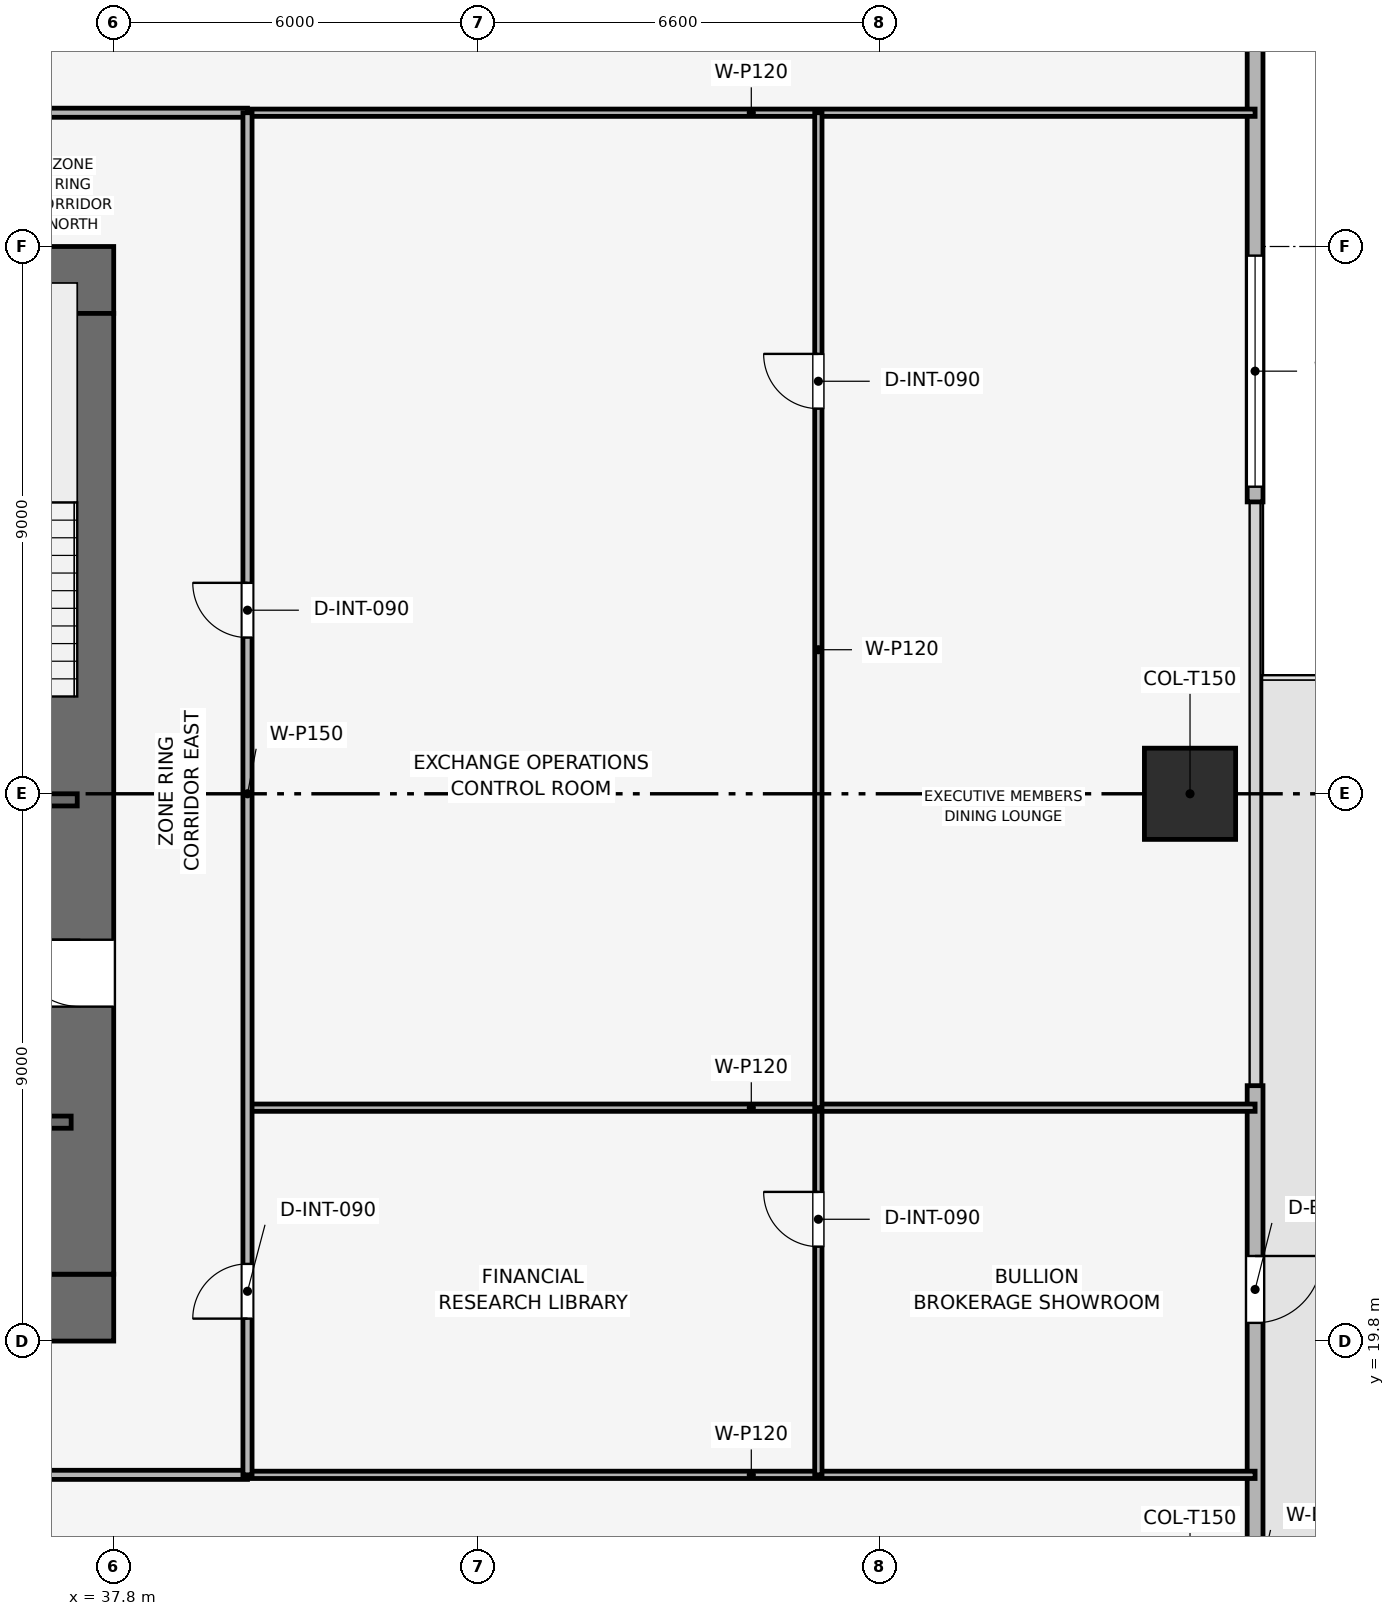
"""IFC4 building model, lengths in metres.
Left out: names, types, materials, properties, quantities, classifications, styles, units other than length and angle.
Written with IfcOpenShell. Run it as: python <this file> out.ifc"""

import sys

from ifc_helpers import new_model, si_unit, direction, frame, frame_2d, origin, origin_2d, place, context, subcontext, project, spatial, rectangle, extrude, element, fill, save


model = new_model("IFC4")
c1 = context("Model", 3, precision=1e-05, world=origin(), true_north=direction((0.0, 1.0)))
c2 = subcontext(c1, "Body", "Model", "MODEL_VIEW")
j1 = project(units=[si_unit("LENGTHUNIT", "METRE"), si_unit("PLANEANGLEUNIT", "RADIAN")], contexts=[c1])
p1 = place(None, origin())
s1 = spatial("IfcSite", under=j1, at=p1, CompositionType="ELEMENT")
p2 = place(p1, origin())
s2 = spatial("IfcBuilding", under=s1, at=p2, CompositionType="ELEMENT")
p3 = place(p2, frame((0.0, 0.0, 41.7)))
s3 = spatial("IfcBuildingStorey", under=s2, at=p3, CompositionType="ELEMENT", Elevation=41.7)
p4 = place(p3, frame((19.8, 20.35, 0.0), z_axis=(0.0, 0.0, 1.0), x_axis=(1.0, 0.0, 0.0)))
e1 = element("IfcWall", 1, at=p4, inside=s3, PredefinedType="SHEAR", context=c2, shape_type="SweptSolid", body=[
    extrude(rectangle(XDim=18.0, YDim=1.1, at=frame_2d((9.0, 0.0))), origin(), (0.0, 0.0, 1.0), 3.9),
])
p5 = place(p4, frame((8.4, 0.0, 0.0)))
e2 = element("IfcOpeningElement", 2, at=p5, cuts=e1, PredefinedType="OPENING", context=c2, shape_type="SweptSolid", body=[
    extrude(rectangle(XDim=1.2, YDim=2.2, at=frame_2d((0.6, 1.1))), frame((0.0, 0.56, 0.0), z_axis=(0.0, -1.0, 0.0), x_axis=(1.0, 0.0, 0.0)), (0.0, 0.0, 1.0), 1.12),
])
p6 = place(p3, frame((19.8, 37.25, 0.0), z_axis=(0.0, 0.0, 1.0), x_axis=(1.0, 0.0, 0.0)))
e3 = element("IfcWall", 3, at=p6, inside=s3, PredefinedType="SHEAR", context=c2, shape_type="SweptSolid", body=[
    extrude(rectangle(XDim=18.0, YDim=1.1, at=frame_2d((9.0, 0.0))), origin(), (0.0, 0.0, 1.0), 3.9),
])
p7 = place(p6, frame((7.05, 0.0, 0.0)))
e4 = element("IfcOpeningElement", 4, at=p7, cuts=e3, PredefinedType="OPENING", context=c2, shape_type="SweptSolid", body=[
    extrude(rectangle(XDim=1.1, YDim=2.15, at=frame_2d((0.55, 1.075))), frame((0.0, 0.56, 0.0), z_axis=(0.0, -1.0, 0.0), x_axis=(1.0, 0.0, 0.0)), (0.0, 0.0, 1.0), 1.12),
])
p8 = place(p3, frame((37.25, 20.9, 0.0), z_axis=(0.0, 0.0, 1.0), x_axis=(0.0, 1.0, 0.0)))
e5 = element("IfcWall", 5, at=p8, inside=s3, PredefinedType="SHEAR", context=c2, shape_type="SweptSolid", body=[
    extrude(rectangle(XDim=15.8, YDim=1.1, at=frame_2d((7.9, 0.0))), origin(), (0.0, 0.0, 1.0), 3.9),
])
p9 = place(p8, frame((4.4, 0.0, 0.0)))
e6 = element("IfcOpeningElement", 6, at=p9, cuts=e5, PredefinedType="OPENING", context=c2, shape_type="SweptSolid", body=[
    extrude(rectangle(XDim=1.1, YDim=2.15, at=frame_2d((0.55, 1.075))), frame((0.0, 0.56, 0.0), z_axis=(0.0, -1.0, 0.0), x_axis=(1.0, 0.0, 0.0)), (0.0, 0.0, 1.0), 1.12),
])
p10 = place(p3, frame((55.5, 28.8, 0.003), z_axis=(0.0, 0.0, 1.0), x_axis=(1.0, 0.0, 0.0)))
e7 = element("IfcColumn", 7, at=p10, inside=s3, PredefinedType="COLUMN", context=c2, shape_type="SweptSolid", body=[
    extrude(rectangle(XDim=1.5, YDim=1.5, at=origin_2d()), origin(), (0.0, 0.0, 1.0), 3.644),
])
p11 = place(p3, frame((56.57, 48.9, 0.0), z_axis=(0.0, 0.0, 1.0), x_axis=(0.0, -1.0, 0.0)))
e8 = element("IfcWall", 8, at=p11, inside=s3, PredefinedType="SOLIDWALL", context=c2, shape_type="SweptSolid", body=[
    extrude(rectangle(XDim=15.3, YDim=0.26, at=frame_2d((7.65, 0.0))), origin(), (0.0, 0.0, 1.0), 3.65),
])
p12 = place(p11, frame((11.25, 0.0, 0.9)))
e9 = element("IfcOpeningElement", 9, at=p12, cuts=e8, PredefinedType="OPENING", context=c2, shape_type="SweptSolid", body=[
    extrude(rectangle(XDim=3.8, YDim=1.9, at=frame_2d((1.9, 0.95))), frame((0.0, 0.14, 0.0), z_axis=(0.0, -1.0, 0.0), x_axis=(1.0, 0.0, 0.0)), (0.0, 0.0, 1.0), 0.28),
])
p13 = place(p3, frame((56.57, 24.0, 0.0), z_axis=(0.0, 0.0, 1.0), x_axis=(0.0, -1.0, 0.0)))
e10 = element("IfcWall", 10, at=p13, inside=s3, PredefinedType="SOLIDWALL", context=c2, shape_type="SweptSolid", body=[
    extrude(rectangle(XDim=15.3, YDim=0.26, at=frame_2d((7.65, 0.0))), origin(), (0.0, 0.0, 1.0), 3.65),
])
p14 = place(p13, frame((2.801, 0.0, 0.0)))
e11 = element("IfcOpeningElement", 11, at=p14, cuts=e10, PredefinedType="OPENING", context=c2, shape_type="SweptSolid", body=[
    extrude(rectangle(XDim=1.1, YDim=2.2, at=frame_2d((0.55, 1.1))), frame((0.0, 0.14, 0.0), z_axis=(0.0, -1.0, 0.0), x_axis=(1.0, 0.0, 0.0)), (0.0, 0.0, 1.0), 0.28),
])
p15 = place(p3, frame((34.05, 28.7, 0.0), z_axis=(0.0, 0.0, 1.0), x_axis=(1.0, 0.0, 0.0)))
e12 = element("IfcWall", 12, at=p15, inside=s3, PredefinedType="SHEAR", context=c2, shape_type="SweptSolid", body=[
    extrude(rectangle(XDim=3.15, YDim=0.2, at=frame_2d((1.575, 0.0))), origin(), (0.0, 0.0, 1.0), 3.65),
])
p16 = place(p15, frame((0.8, 0.0, 0.0)))
e13 = element("IfcOpeningElement", 13, at=p16, cuts=e12, PredefinedType="OPENING", context=c2, shape_type="SweptSolid", body=[
    extrude(rectangle(XDim=1.0, YDim=2.1, at=frame_2d((0.5, 1.05))), frame((0.0, 0.11, 0.0), z_axis=(0.0, -1.0, 0.0), x_axis=(1.0, 0.0, 0.0)), (0.0, 0.0, 1.0), 0.22),
])
p17 = place(p3, frame((34.05, 23.4, 0.0), z_axis=(0.0, 0.0, 1.0), x_axis=(1.0, 0.0, 0.0)))
e14 = element("IfcWall", 14, at=p17, inside=s3, PredefinedType="SHEAR", context=c2, shape_type="SweptSolid", body=[
    extrude(rectangle(XDim=3.05, YDim=0.2, at=frame_2d((1.525, 0.0))), origin(), (0.0, 0.0, 1.0), 3.65),
])
p18 = place(p17, frame((1.2, 0.0, 0.0)))
e15 = element("IfcOpeningElement", 15, at=p18, cuts=e14, PredefinedType="OPENING", context=c2, shape_type="SweptSolid", body=[
    extrude(rectangle(XDim=1.1, YDim=2.15, at=frame_2d((0.55, 1.075))), frame((0.0, 0.11, 0.0), z_axis=(0.0, -1.0, 0.0), x_axis=(1.0, 0.0, 0.0)), (0.0, 0.0, 1.0), 0.22),
])
for number, where, z_axis, x_axis in (
    (16, (40.0, 17.6, 0.0), (0.0, 0.0, 1.0), (1.0, 0.0, 0.0)),
    (17, (40.0, 40.0, 0.0), (0.0, 0.0, 1.0), (1.0, 0.0, 0.0)),
):
    element("IfcWall", number, at=place(p3, frame(where, z_axis=z_axis, x_axis=x_axis)), inside=s3, PredefinedType="PARTITIONING", context=c2, shape_type="SweptSolid", body=[
        extrude(rectangle(XDim=16.57, YDim=0.12, at=frame_2d((8.285, 0.0))), origin(), (0.0, 0.0, 1.0), 2.935),
    ])
p19 = place(p3, frame((49.388, 17.6, 0.0), z_axis=(0.0, 0.0, 1.0), x_axis=(0.0, 1.0, 0.0)))
e18 = element("IfcWall", 18, at=p19, inside=s3, PredefinedType="PARTITIONING", context=c2, shape_type="SweptSolid", body=[
    extrude(rectangle(XDim=6.038, YDim=0.12, at=frame_2d((3.019, 0.0))), origin(), (0.0, 0.0, 1.0), 3.085),
])
p20 = place(p19, frame((3.753, 0.0, 0.0)))
e19 = element("IfcOpeningElement", 19, at=p20, cuts=e18, PredefinedType="OPENING", context=c2, shape_type="SweptSolid", body=[
    extrude(rectangle(XDim=0.9, YDim=2.1, at=frame_2d((0.45, 1.05))), frame((0.0, 0.07, 0.0), z_axis=(0.0, -1.0, 0.0), x_axis=(1.0, 0.0, 0.0)), (0.0, 0.0, 1.0), 0.14),
])
p21 = place(p3, frame((40.0, 23.638, 0.0), z_axis=(0.0, 0.0, 1.0), x_axis=(1.0, 0.0, 0.0)))
e20 = element("IfcWall", 20, at=p21, inside=s3, PredefinedType="PARTITIONING", context=c2, shape_type="SweptSolid", body=[
    extrude(rectangle(XDim=16.57, YDim=0.12, at=frame_2d((8.285, 0.0))), origin(), (0.0, 0.0, 1.0), 2.935),
])
p22 = place(p3, frame((49.388, 23.638, 0.0), z_axis=(0.0, 0.0, 1.0), x_axis=(0.0, 1.0, 0.0)))
e21 = element("IfcWall", 21, at=p22, inside=s3, PredefinedType="PARTITIONING", context=c2, shape_type="SweptSolid", body=[
    extrude(rectangle(XDim=16.362, YDim=0.12, at=frame_2d((8.181, 0.0))), origin(), (0.0, 0.0, 1.0), 3.085),
])
p23 = place(p22, frame((11.496, 0.0, 0.0)))
e22 = element("IfcOpeningElement", 22, at=p23, cuts=e21, PredefinedType="OPENING", context=c2, shape_type="SweptSolid", body=[
    extrude(rectangle(XDim=0.9, YDim=2.1, at=frame_2d((0.45, 1.05))), frame((0.0, 0.07, 0.0), z_axis=(0.0, -1.0, 0.0), x_axis=(1.0, 0.0, 0.0)), (0.0, 0.0, 1.0), 0.14),
])
p24 = place(p3, frame((17.6, 17.6, 0.0), z_axis=(0.0, 0.0, 1.0), x_axis=(1.0, 0.0, 0.0)))
e23 = element("IfcWall", 23, at=p24, inside=s3, PredefinedType="PARTITIONING", context=c2, shape_type="SweptSolid", body=[
    extrude(rectangle(XDim=22.4, YDim=0.15, at=frame_2d((11.2, 0.0))), origin(), (0.0, 0.0, 1.0), 3.085),
])
p25 = place(p24, frame((0.7, 0.0, 0.0)))
e24 = element("IfcOpeningElement", 24, at=p25, cuts=e23, PredefinedType="OPENING", context=c2, shape_type="SweptSolid", body=[
    extrude(rectangle(XDim=0.9, YDim=2.1, at=frame_2d((0.45, 1.05))), frame((0.0, 0.085, 0.0), z_axis=(0.0, -1.0, 0.0), x_axis=(1.0, 0.0, 0.0)), (0.0, 0.0, 1.0), 0.17),
])
p26 = place(p24, frame((4.94, 0.0, 0.0)))
e25 = element("IfcOpeningElement", 25, at=p26, cuts=e23, PredefinedType="OPENING", context=c2, shape_type="SweptSolid", body=[
    extrude(rectangle(XDim=0.9, YDim=2.1, at=frame_2d((0.45, 1.05))), frame((0.0, 0.085, 0.0), z_axis=(0.0, -1.0, 0.0), x_axis=(1.0, 0.0, 0.0)), (0.0, 0.0, 1.0), 0.17),
])
p27 = place(p24, frame((10.912, 0.0, 0.0)))
e26 = element("IfcOpeningElement", 26, at=p27, cuts=e23, PredefinedType="OPENING", context=c2, shape_type="SweptSolid", body=[
    extrude(rectangle(XDim=0.9, YDim=2.1, at=frame_2d((0.45, 1.05))), frame((0.0, 0.085, 0.0), z_axis=(0.0, -1.0, 0.0), x_axis=(1.0, 0.0, 0.0)), (0.0, 0.0, 1.0), 0.17),
])
p28 = place(p24, frame((17.872, 0.0, 0.0)))
e27 = element("IfcOpeningElement", 27, at=p28, cuts=e23, PredefinedType="OPENING", context=c2, shape_type="SweptSolid", body=[
    extrude(rectangle(XDim=0.9, YDim=2.1, at=frame_2d((0.45, 1.05))), frame((0.0, 0.085, 0.0), z_axis=(0.0, -1.0, 0.0), x_axis=(1.0, 0.0, 0.0)), (0.0, 0.0, 1.0), 0.17),
])
p29 = place(p3, frame((17.6, 40.0, 0.0), z_axis=(0.0, 0.0, 1.0), x_axis=(1.0, 0.0, 0.0)))
e28 = element("IfcWall", 28, at=p29, inside=s3, PredefinedType="PARTITIONING", context=c2, shape_type="SweptSolid", body=[
    extrude(rectangle(XDim=22.4, YDim=0.15, at=frame_2d((11.2, 0.0))), origin(), (0.0, 0.0, 1.0), 3.085),
])
p30 = place(p29, frame((1.95, 0.0, 0.0)))
e29 = element("IfcOpeningElement", 29, at=p30, cuts=e28, PredefinedType="OPENING", context=c2, shape_type="SweptSolid", body=[
    extrude(rectangle(XDim=0.9, YDim=2.1, at=frame_2d((0.45, 1.05))), frame((0.0, 0.085, 0.0), z_axis=(0.0, -1.0, 0.0), x_axis=(1.0, 0.0, 0.0)), (0.0, 0.0, 1.0), 0.17),
])
p31 = place(p29, frame((5.75, 0.0, 0.0)))
e30 = element("IfcOpeningElement", 30, at=p31, cuts=e28, PredefinedType="OPENING", context=c2, shape_type="SweptSolid", body=[
    extrude(rectangle(XDim=0.9, YDim=2.1, at=frame_2d((0.45, 1.05))), frame((0.0, 0.085, 0.0), z_axis=(0.0, -1.0, 0.0), x_axis=(1.0, 0.0, 0.0)), (0.0, 0.0, 1.0), 0.17),
])
p32 = place(p29, frame((8.65, 0.0, 0.0)))
e31 = element("IfcOpeningElement", 31, at=p32, cuts=e28, PredefinedType="OPENING", context=c2, shape_type="SweptSolid", body=[
    extrude(rectangle(XDim=0.9, YDim=2.1, at=frame_2d((0.45, 1.05))), frame((0.0, 0.085, 0.0), z_axis=(0.0, -1.0, 0.0), x_axis=(1.0, 0.0, 0.0)), (0.0, 0.0, 1.0), 0.17),
])
p33 = place(p29, frame((11.4, 0.0, 0.0)))
e32 = element("IfcOpeningElement", 32, at=p33, cuts=e28, PredefinedType="OPENING", context=c2, shape_type="SweptSolid", body=[
    extrude(rectangle(XDim=0.95, YDim=2.1, at=frame_2d((0.475, 1.05))), frame((0.0, 0.085, 0.0), z_axis=(0.0, -1.0, 0.0), x_axis=(1.0, 0.0, 0.0)), (0.0, 0.0, 1.0), 0.17),
])
p34 = place(p29, frame((17.35, 0.0, 0.0)))
e33 = element("IfcOpeningElement", 33, at=p34, cuts=e28, PredefinedType="OPENING", context=c2, shape_type="SweptSolid", body=[
    extrude(rectangle(XDim=0.9, YDim=2.1, at=frame_2d((0.45, 1.05))), frame((0.0, 0.085, 0.0), z_axis=(0.0, -1.0, 0.0), x_axis=(1.0, 0.0, 0.0)), (0.0, 0.0, 1.0), 0.17),
])
p35 = place(p3, frame((40.0, 17.6, 0.0), z_axis=(0.0, 0.0, 1.0), x_axis=(0.0, 1.0, 0.0)))
e34 = element("IfcWall", 34, at=p35, inside=s3, PredefinedType="PARTITIONING", context=c2, shape_type="SweptSolid", body=[
    extrude(rectangle(XDim=22.4, YDim=0.15, at=frame_2d((11.2, 0.0))), origin(), (0.0, 0.0, 1.0), 3.085),
])
p36 = place(p35, frame((2.569, 0.0, 0.0)))
e35 = element("IfcOpeningElement", 35, at=p36, cuts=e34, PredefinedType="OPENING", context=c2, shape_type="SweptSolid", body=[
    extrude(rectangle(XDim=0.9, YDim=2.1, at=frame_2d((0.45, 1.05))), frame((0.0, 0.085, 0.0), z_axis=(0.0, -1.0, 0.0), x_axis=(1.0, 0.0, 0.0)), (0.0, 0.0, 1.0), 0.17),
])
p37 = place(p35, frame((13.769, 0.0, 0.0)))
e36 = element("IfcOpeningElement", 36, at=p37, cuts=e34, PredefinedType="OPENING", context=c2, shape_type="SweptSolid", body=[
    extrude(rectangle(XDim=0.9, YDim=2.1, at=frame_2d((0.45, 1.05))), frame((0.0, 0.085, 0.0), z_axis=(0.0, -1.0, 0.0), x_axis=(1.0, 0.0, 0.0)), (0.0, 0.0, 1.0), 0.17),
])
p38 = place(p14, origin())
e37 = element("IfcDoor", 37, at=p38, inside=s3, OperationType="SINGLE_SWING_LEFT", PredefinedType="DOOR", context=c2, shape_type="SweptSolid", body=[
    extrude(rectangle(XDim=1.1, YDim=2.2, at=frame_2d((0.55, 1.1))), frame((0.0, 0.025, 0.0), z_axis=(0.0, -1.0, 0.0), x_axis=(1.0, 0.0, 0.0)), (0.0, 0.0, 1.0), 0.05),
])
fill(e11, e37)
p39 = place(p12, origin())
e38 = element("IfcWindow", 38, at=p39, inside=s3, PartitioningType="SINGLE_PANEL", PredefinedType="WINDOW", context=c2, shape_type="SweptSolid", body=[
    extrude(rectangle(XDim=3.8, YDim=1.9, at=frame_2d((1.9, 0.95))), frame((0.0, 0.03, 0.0), z_axis=(0.0, -1.0, 0.0), x_axis=(1.0, 0.0, 0.0)), (0.0, 0.0, 1.0), 0.06),
])
fill(e9, e38)
p40 = place(p20, origin())
e39 = element("IfcDoor", 39, at=p40, inside=s3, OperationType="SINGLE_SWING_RIGHT", PredefinedType="DOOR", context=c2, shape_type="SweptSolid", body=[
    extrude(rectangle(XDim=0.9, YDim=2.1, at=frame_2d((0.45, 1.05))), frame((0.0, 0.025, 0.0), z_axis=(0.0, -1.0, 0.0), x_axis=(1.0, 0.0, 0.0)), (0.0, 0.0, 1.0), 0.05),
])
fill(e19, e39)
p41 = place(p23, origin())
e40 = element("IfcDoor", 40, at=p41, inside=s3, OperationType="SINGLE_SWING_RIGHT", PredefinedType="DOOR", context=c2, shape_type="SweptSolid", body=[
    extrude(rectangle(XDim=0.9, YDim=2.1, at=frame_2d((0.45, 1.05))), frame((0.0, 0.025, 0.0), z_axis=(0.0, -1.0, 0.0), x_axis=(1.0, 0.0, 0.0)), (0.0, 0.0, 1.0), 0.05),
])
fill(e22, e40)
p42 = place(p36, origin())
e41 = element("IfcDoor", 41, at=p42, inside=s3, OperationType="SINGLE_SWING_LEFT", PredefinedType="DOOR", context=c2, shape_type="SweptSolid", body=[
    extrude(rectangle(XDim=0.9, YDim=2.1, at=frame_2d((0.45, 1.05))), frame((0.0, 0.025, 0.0), z_axis=(0.0, -1.0, 0.0), x_axis=(1.0, 0.0, 0.0)), (0.0, 0.0, 1.0), 0.05),
])
fill(e35, e41)
p43 = place(p37, origin())
e42 = element("IfcDoor", 42, at=p43, inside=s3, OperationType="SINGLE_SWING_RIGHT", PredefinedType="DOOR", context=c2, shape_type="SweptSolid", body=[
    extrude(rectangle(XDim=0.9, YDim=2.1, at=frame_2d((0.45, 1.05))), frame((0.0, 0.025, 0.0), z_axis=(0.0, -1.0, 0.0), x_axis=(1.0, 0.0, 0.0)), (0.0, 0.0, 1.0), 0.05),
])
fill(e36, e42)
p44 = place(p9, origin())
e43 = element("IfcDoor", 43, at=p44, inside=s3, OperationType="SINGLE_SWING_RIGHT", PredefinedType="DOOR", context=c2, shape_type="SweptSolid", body=[
    extrude(rectangle(XDim=1.1, YDim=2.15, at=frame_2d((0.55, 1.075))), frame((0.0, 0.025, 0.0), z_axis=(0.0, -1.0, 0.0), x_axis=(1.0, 0.0, 0.0)), (0.0, 0.0, 1.0), 0.05),
])
fill(e6, e43)
save(model, sys.argv[1])
